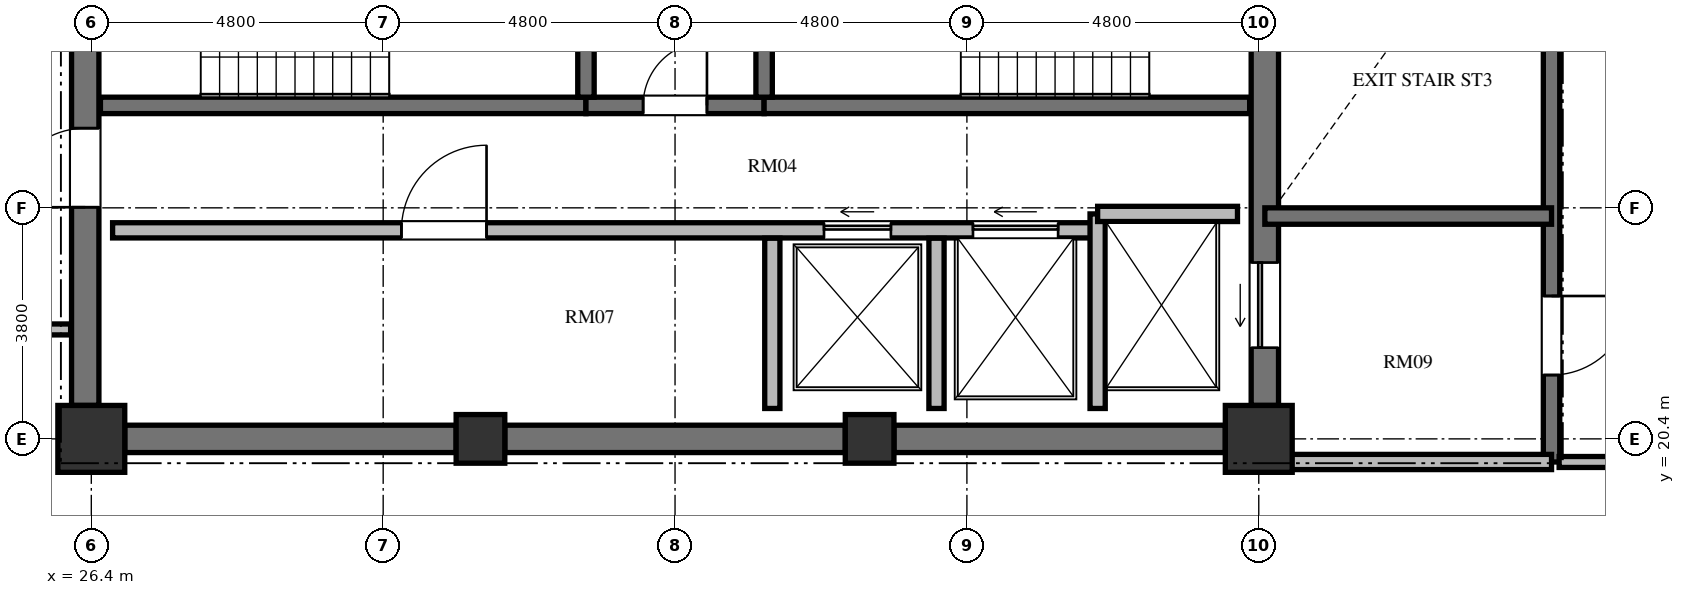
"""IFC4 building model, lengths in metres.
Left out: names, types, materials, properties, quantities, classifications, styles, units other than length and angle.
Written with IfcOpenShell. Run it as: python <this file> out.ifc"""

import sys

from ifc_helpers import new_model, si_unit, direction, frame, frame_2d, origin, origin_2d, place, context, subcontext, project, spatial, rectangle, extrude, element, fill, save


model = new_model("IFC4")
c1 = context("Model", 3, precision=1e-05, world=origin(), true_north=direction((0.0, 1.0)))
c2 = subcontext(c1, "Body", "Model", "MODEL_VIEW")
j1 = project(units=[si_unit("LENGTHUNIT", "METRE"), si_unit("PLANEANGLEUNIT", "RADIAN")], contexts=[c1])
p1 = place(None, origin())
s1 = spatial("IfcSite", under=j1, at=p1, CompositionType="ELEMENT")
p2 = place(p1, origin())
s2 = spatial("IfcBuilding", under=s1, at=p2, CompositionType="ELEMENT")
p3 = place(p2, frame((0.0, 0.0, 298.8)))
s3 = spatial("IfcBuildingStorey", under=s2, at=p3, CompositionType="ELEMENT", Elevation=298.8)
p4 = place(p3, frame((26.4, 20.4, 0.0), z_axis=(0.0, 0.0, 1.0), x_axis=(1.0, 0.0, 0.0)))
e1 = element("IfcColumn", 1, at=p4, inside=s3, PredefinedType="COLUMN", context=c2, shape_type="SweptSolid", body=[
    extrude(rectangle(XDim=1.1, YDim=1.1, at=origin_2d()), origin(), (0.0, 0.0, 1.0), 3.648),
])
for number, where, z_axis, x_axis in (
    (2, (32.8, 20.4, 0.0), (0.0, 0.0, 1.0), (1.0, 0.0, 0.0)),
    (3, (39.2, 20.4, 0.0), (0.0, 0.0, 1.0), (1.0, 0.0, 0.0)),
):
    element("IfcColumn", number, at=place(p3, frame(where, z_axis=z_axis, x_axis=x_axis)), inside=s3, PredefinedType="COLUMN", context=c2, shape_type="SweptSolid", body=[
        extrude(rectangle(XDim=0.8, YDim=0.8, at=origin_2d()), origin(), (0.0, 0.0, 1.0), 3.648),
    ])
p5 = place(p3, frame((45.6, 20.4, 0.0), z_axis=(0.0, 0.0, 1.0), x_axis=(1.0, 0.0, 0.0)))
e4 = element("IfcColumn", 4, at=p5, inside=s3, PredefinedType="COLUMN", context=c2, shape_type="SweptSolid", body=[
    extrude(rectangle(XDim=1.1, YDim=1.1, at=origin_2d()), origin(), (0.0, 0.0, 1.0), 3.648),
])
p6 = place(p3, frame((26.3, 20.95, 0.0), z_axis=(0.0, 0.0, 1.0), x_axis=(0.0, 1.0, 0.0)))
e5 = element("IfcWall", 5, at=p6, inside=s3, PredefinedType="SHEAR", context=c2, shape_type="SweptSolid", body=[
    extrude(rectangle(XDim=14.1, YDim=0.45, at=frame_2d((7.05, 0.0))), origin(), (0.0, 0.0, 1.0), 3.648),
])
p7 = place(p6, frame((6.5, 0.0, 0.0)))
e6 = element("IfcOpeningElement", 6, at=p7, cuts=e5, PredefinedType="OPENING", context=c2, shape_type="SweptSolid", body=[
    extrude(rectangle(XDim=1.2, YDim=2.15, at=frame_2d((0.6, 1.075))), frame((0.0, 0.235, 0.0), z_axis=(0.0, -1.0, 0.0), x_axis=(1.0, 0.0, 0.0)), (0.0, 0.0, 1.0), 0.47),
])
p8 = place(p6, frame((9.6, 0.0, 0.0)))
e7 = element("IfcOpeningElement", 7, at=p8, cuts=e5, PredefinedType="OPENING", context=c2, shape_type="SweptSolid", body=[
    extrude(rectangle(XDim=1.3, YDim=2.2, at=frame_2d((0.65, 1.1))), frame((0.0, 0.235, 0.0), z_axis=(0.0, -1.0, 0.0), x_axis=(1.0, 0.0, 0.0)), (0.0, 0.0, 1.0), 0.47),
])
p9 = place(p6, frame((3.26, 0.0, 0.0)))
e8 = element("IfcOpeningElement", 8, at=p9, cuts=e5, PredefinedType="OPENING", context=c2, shape_type="SweptSolid", body=[
    extrude(rectangle(XDim=1.3, YDim=2.2, at=frame_2d((0.65, 1.1))), frame((0.0, 0.235, 0.0), z_axis=(0.0, -1.0, 0.0), x_axis=(1.0, 0.0, 0.0)), (0.0, 0.0, 1.0), 0.47),
])
p10 = place(p3, frame((45.7, 20.95, 0.0), z_axis=(0.0, 0.0, 1.0), x_axis=(0.0, 1.0, 0.0)))
e9 = element("IfcWall", 9, at=p10, inside=s3, PredefinedType="SHEAR", context=c2, shape_type="SweptSolid", body=[
    extrude(rectangle(XDim=14.1, YDim=0.45, at=frame_2d((7.05, 0.0))), origin(), (0.0, 0.0, 1.0), 3.648),
])
p11 = place(p10, frame((11.75, 0.0, 0.0)))
e10 = element("IfcOpeningElement", 10, at=p11, cuts=e9, PredefinedType="OPENING", context=c2, shape_type="SweptSolid", body=[
    extrude(rectangle(XDim=1.4, YDim=2.3, at=frame_2d((0.7, 1.15))), frame((0.0, 0.235, 0.0), z_axis=(0.0, -1.0, 0.0), x_axis=(1.0, 0.0, 0.0)), (0.0, 0.0, 1.0), 0.47),
])
p12 = place(p10, frame((0.95, 0.0, 0.0)))
e11 = element("IfcOpeningElement", 11, at=p12, cuts=e9, PredefinedType="OPENING", context=c2, shape_type="SweptSolid", body=[
    extrude(rectangle(XDim=1.4, YDim=2.3, at=frame_2d((0.7, 1.15))), frame((0.0, 0.235, 0.0), z_axis=(0.0, -1.0, 0.0), x_axis=(1.0, 0.0, 0.0)), (0.0, 0.0, 1.0), 0.47),
])
p13 = place(p3, frame((26.95, 20.4, 0.0), z_axis=(0.0, 0.0, 1.0), x_axis=(1.0, 0.0, 0.0)))
e12 = element("IfcWall", 12, at=p13, inside=s3, PredefinedType="SHEAR", context=c2, shape_type="SweptSolid", body=[
    extrude(rectangle(XDim=5.45, YDim=0.45, at=frame_2d((2.725, 0.0))), origin(), (0.0, 0.0, 1.0), 3.648),
])
p14 = place(p3, frame((33.2, 20.4, 0.0), z_axis=(0.0, 0.0, 1.0), x_axis=(1.0, 0.0, 0.0)))
e13 = element("IfcWall", 13, at=p14, inside=s3, PredefinedType="SHEAR", context=c2, shape_type="SweptSolid", body=[
    extrude(rectangle(XDim=5.6, YDim=0.45, at=frame_2d((2.8, 0.0))), origin(), (0.0, 0.0, 1.0), 3.648),
])
p15 = place(p3, frame((39.6, 20.4, 0.0), z_axis=(0.0, 0.0, 1.0), x_axis=(1.0, 0.0, 0.0)))
e14 = element("IfcWall", 14, at=p15, inside=s3, PredefinedType="SHEAR", context=c2, shape_type="SweptSolid", body=[
    extrude(rectangle(XDim=5.45, YDim=0.45, at=frame_2d((2.725, 0.0))), origin(), (0.0, 0.0, 1.0), 3.648),
])
p16 = place(p3, frame((26.55, 25.885, 0.0), z_axis=(0.0, 0.0, 1.0), x_axis=(1.0, 0.0, 0.0)))
e15 = element("IfcWall", 15, at=p16, inside=s3, PredefinedType="SHEAR", context=c2, shape_type="SweptSolid", body=[
    extrude(rectangle(XDim=7.985, YDim=0.27, at=frame_2d((3.992, 0.0))), origin(), (0.0, 0.0, 1.0), 3.648),
])
p17 = place(p3, frame((34.535, 25.885, 0.0), z_axis=(0.0, 0.0, 1.0), x_axis=(1.0, 0.0, 0.0)))
e16 = element("IfcWall", 16, at=p17, inside=s3, PredefinedType="SHEAR", context=c2, shape_type="SweptSolid", body=[
    extrude(rectangle(XDim=2.93, YDim=0.27, at=frame_2d((1.465, 0.0))), origin(), (0.0, 0.0, 1.0), 3.648),
])
p18 = place(p17, frame((0.94, 0.0, 0.0)))
e17 = element("IfcOpeningElement", 17, at=p18, cuts=e16, PredefinedType="OPENING", context=c2, shape_type="SweptSolid", body=[
    extrude(rectangle(XDim=1.05, YDim=2.15, at=frame_2d((0.525, 1.075))), frame((0.0, 0.145, 0.0), z_axis=(0.0, -1.0, 0.0), x_axis=(1.0, 0.0, 0.0)), (0.0, 0.0, 1.0), 0.29),
])
p19 = place(p3, frame((37.465, 25.885, 0.0), z_axis=(0.0, 0.0, 1.0), x_axis=(1.0, 0.0, 0.0)))
e18 = element("IfcWall", 18, at=p19, inside=s3, PredefinedType="SHEAR", context=c2, shape_type="SweptSolid", body=[
    extrude(rectangle(XDim=7.985, YDim=0.27, at=frame_2d((3.992, 0.0))), origin(), (0.0, 0.0, 1.0), 3.648),
])
for number, where, z_axis, x_axis in (
    (19, (34.535, 26.02, 0.0), (0.0, 0.0, 1.0), (0.0, 1.0, 0.0)),
    (20, (37.465, 26.02, 0.0), (0.0, 0.0, 1.0), (0.0, 1.0, 0.0)),
):
    element("IfcWall", number, at=place(p3, frame(where, z_axis=z_axis, x_axis=x_axis)), inside=s3, PredefinedType="SHEAR", context=c2, shape_type="SweptSolid", body=[
        extrude(rectangle(XDim=4.08, YDim=0.27, at=frame_2d((2.04, 0.0))), origin(), (0.0, 0.0, 1.0), 3.648),
    ])
p20 = place(p3, frame((26.75, 23.83, 0.0), z_axis=(0.0, 0.0, 1.0), x_axis=(1.0, 0.0, 0.0)))
e21 = element("IfcWall", 21, at=p20, inside=s3, PredefinedType="SOLIDWALL", context=c2, shape_type="SweptSolid", body=[
    extrude(rectangle(XDim=16.2, YDim=0.25, at=frame_2d((8.1, 0.0))), origin(), (0.0, 0.0, 1.0), 3.328),
])
p21 = place(p20, frame((4.75, 0.0, 0.0)))
e22 = element("IfcOpeningElement", 22, at=p21, cuts=e21, PredefinedType="OPENING", context=c2, shape_type="SweptSolid", body=[
    extrude(rectangle(XDim=1.4, YDim=2.2, at=frame_2d((0.7, 1.1))), frame((0.0, 0.135, 0.0), z_axis=(0.0, -1.0, 0.0), x_axis=(1.0, 0.0, 0.0)), (0.0, 0.0, 1.0), 0.27),
])
p22 = place(p20, frame((11.7, 0.0, 0.0)))
e23 = element("IfcOpeningElement", 23, at=p22, cuts=e21, PredefinedType="OPENING", context=c2, shape_type="SweptSolid", body=[
    extrude(rectangle(XDim=1.1, YDim=2.2, at=frame_2d((0.55, 1.1))), frame((0.0, 0.135, 0.0), z_axis=(0.0, -1.0, 0.0), x_axis=(1.0, 0.0, 0.0)), (0.0, 0.0, 1.0), 0.27),
])
p23 = place(p20, frame((14.15, 0.0, 0.0)))
e24 = element("IfcOpeningElement", 24, at=p23, cuts=e21, PredefinedType="OPENING", context=c2, shape_type="SweptSolid", body=[
    extrude(rectangle(XDim=1.4, YDim=2.3, at=frame_2d((0.7, 1.15))), frame((0.0, 0.135, 0.0), z_axis=(0.0, -1.0, 0.0), x_axis=(1.0, 0.0, 0.0)), (0.0, 0.0, 1.0), 0.27),
])
p24 = place(p3, frame((42.95, 20.9, 0.0), z_axis=(0.0, 0.0, 1.0), x_axis=(0.0, 1.0, 0.0)))
e25 = element("IfcWall", 25, at=p24, inside=s3, PredefinedType="SOLIDWALL", context=c2, shape_type="SweptSolid", body=[
    extrude(rectangle(XDim=3.2, YDim=0.25, at=frame_2d((1.6, 0.0))), origin(), (0.0, 0.0, 1.0), 3.328),
])
p25 = place(p3, frame((42.95, 24.1, 0.0), z_axis=(0.0, 0.0, 1.0), x_axis=(1.0, 0.0, 0.0)))
e26 = element("IfcWall", 26, at=p25, inside=s3, PredefinedType="SOLIDWALL", context=c2, shape_type="SweptSolid", body=[
    extrude(rectangle(XDim=2.3, YDim=0.25, at=frame_2d((1.15, 0.0))), origin(), (0.0, 0.0, 1.0), 3.328),
])
for number, where, z_axis, x_axis in (
    (27, (37.6, 20.9, 0.0), (0.0, 0.0, 1.0), (0.0, 1.0, 0.0)),
    (28, (40.3, 20.9, 0.0), (0.0, 0.0, 1.0), (0.0, 1.0, 0.0)),
):
    element("IfcWall", number, at=place(p3, frame(where, z_axis=z_axis, x_axis=x_axis)), inside=s3, PredefinedType="SOLIDWALL", context=c2, shape_type="SweptSolid", body=[
        extrude(rectangle(XDim=2.8, YDim=0.25, at=frame_2d((1.4, 0.0))), origin(), (0.0, 0.0, 1.0), 3.328),
    ])
p26 = place(p3, frame((50.415, 35.845, 0.0), z_axis=(0.0, 0.0, 1.0), x_axis=(0.0, -1.0, 0.0)))
e29 = element("IfcWall", 29, at=p26, inside=s3, PredefinedType="SHEAR", context=c2, shape_type="SweptSolid", body=[
    extrude(rectangle(XDim=15.825, YDim=0.27, at=frame_2d((7.913, 0.0))), origin(), (0.0, 0.0, 1.0), 3.648),
])
p27 = place(p26, frame((4.445, 0.0, 0.0)))
e30 = element("IfcOpeningElement", 30, at=p27, cuts=e29, PredefinedType="OPENING", context=c2, shape_type="SweptSolid", body=[
    extrude(rectangle(XDim=1.2, YDim=2.15, at=frame_2d((0.6, 1.075))), frame((0.0, 0.145, 0.0), z_axis=(0.0, -1.0, 0.0), x_axis=(1.0, 0.0, 0.0)), (0.0, 0.0, 1.0), 0.29),
])
p28 = place(p26, frame((2.445, 0.0, 0.0)))
e31 = element("IfcOpeningElement", 31, at=p28, cuts=e29, PredefinedType="OPENING", context=c2, shape_type="SweptSolid", body=[
    extrude(rectangle(XDim=1.3, YDim=2.2, at=frame_2d((0.65, 1.1))), frame((0.0, 0.145, 0.0), z_axis=(0.0, -1.0, 0.0), x_axis=(1.0, 0.0, 0.0)), (0.0, 0.0, 1.0), 0.29),
])
p29 = place(p26, frame((13.095, 0.0, 0.0)))
e32 = element("IfcOpeningElement", 32, at=p29, cuts=e29, PredefinedType="OPENING", context=c2, shape_type="SweptSolid", body=[
    extrude(rectangle(XDim=1.3, YDim=2.2, at=frame_2d((0.65, 1.1))), frame((0.0, 0.145, 0.0), z_axis=(0.0, -1.0, 0.0), x_axis=(1.0, 0.0, 0.0)), (0.0, 0.0, 1.0), 0.29),
])
p30 = place(p3, frame((45.7, 24.065, 0.0), z_axis=(0.0, 0.0, 1.0), x_axis=(1.0, 0.0, 0.0)))
e33 = element("IfcWall", 33, at=p30, inside=s3, PredefinedType="SHEAR", context=c2, shape_type="SweptSolid", body=[
    extrude(rectangle(XDim=4.715, YDim=0.27, at=frame_2d((2.357, 0.0))), origin(), (0.0, 0.0, 1.0), 3.648),
])
p31 = place(p3, frame((45.7, 20.02, 0.0), z_axis=(0.0, 0.0, 1.0), x_axis=(1.0, 0.0, 0.0)))
e34 = element("IfcWall", 34, at=p31, inside=s3, PredefinedType="SOLIDWALL", context=c2, shape_type="SweptSolid", body=[
    extrude(rectangle(XDim=4.715, YDim=0.25, at=frame_2d((2.357, 0.0))), origin(), (0.0, 0.0, 1.0), 3.328),
])
p32 = place(p3, frame((52.358, 20.02, 0.0), z_axis=(0.0, 0.0, 1.0), x_axis=(-1.0, 0.0, 0.0)))
e35 = element("IfcWall", 35, at=p32, inside=s3, PredefinedType="PARTITIONING", context=c2, shape_type="SweptSolid", body=[
    extrude(rectangle(XDim=1.818, YDim=0.18, at=frame_2d((0.909, 0.0))), origin(), (0.0, 0.0, 1.0), 2.113),
])
p33 = place(p3, frame((26.06, 22.2, 0.0), z_axis=(0.0, 0.0, 1.0), x_axis=(-1.0, 0.0, 0.0)))
e36 = element("IfcWall", 36, at=p33, inside=s3, PredefinedType="PARTITIONING", context=c2, shape_type="SweptSolid", body=[
    extrude(rectangle(XDim=2.35, YDim=0.18, at=frame_2d((1.175, 0.0))), origin(), (0.0, 0.0, 1.0), 3.328),
])
p34 = place(p18, origin())
e37 = element("IfcDoor", 37, at=p34, inside=s3, OperationType="SINGLE_SWING_RIGHT", PredefinedType="DOOR", context=c2, shape_type="SweptSolid", body=[
    extrude(rectangle(XDim=1.05, YDim=2.15, at=frame_2d((0.525, 1.075))), frame((0.0, 0.025, 0.0), z_axis=(0.0, -1.0, 0.0), x_axis=(1.0, 0.0, 0.0)), (0.0, 0.0, 1.0), 0.05),
])
fill(e17, e37)
p35 = place(p9, origin())
e38 = element("IfcDoor", 38, at=p35, inside=s3, OperationType="SINGLE_SWING_LEFT", PredefinedType="DOOR", context=c2, shape_type="SweptSolid", body=[
    extrude(rectangle(XDim=1.3, YDim=2.2, at=frame_2d((0.65, 1.1))), frame((0.0, 0.025, 0.0), z_axis=(0.0, -1.0, 0.0), x_axis=(1.0, 0.0, 0.0)), (0.0, 0.0, 1.0), 0.05),
])
fill(e8, e38)
p36 = place(p21, origin())
e39 = element("IfcDoor", 39, at=p36, inside=s3, OperationType="SINGLE_SWING_RIGHT", PredefinedType="DOOR", context=c2, shape_type="SweptSolid", body=[
    extrude(rectangle(XDim=1.4, YDim=2.2, at=frame_2d((0.7, 1.1))), frame((0.0, 0.025, 0.0), z_axis=(0.0, -1.0, 0.0), x_axis=(1.0, 0.0, 0.0)), (0.0, 0.0, 1.0), 0.05),
])
fill(e22, e39)
p37 = place(p22, origin())
e40 = element("IfcDoor", 40, at=p37, inside=s3, OperationType="SLIDING_TO_LEFT", PredefinedType="DOOR", context=c2, shape_type="SweptSolid", body=[
    extrude(rectangle(XDim=1.1, YDim=2.2, at=frame_2d((0.55, 1.1))), frame((0.0, 0.025, 0.0), z_axis=(0.0, -1.0, 0.0), x_axis=(1.0, 0.0, 0.0)), (0.0, 0.0, 1.0), 0.05),
])
fill(e23, e40)
p38 = place(p12, origin())
e41 = element("IfcDoor", 41, at=p38, inside=s3, OperationType="SLIDING_TO_LEFT", PredefinedType="DOOR", context=c2, shape_type="SweptSolid", body=[
    extrude(rectangle(XDim=1.4, YDim=2.3, at=frame_2d((0.7, 1.15))), frame((0.0, 0.025, 0.0), z_axis=(0.0, -1.0, 0.0), x_axis=(1.0, 0.0, 0.0)), (0.0, 0.0, 1.0), 0.05),
])
fill(e11, e41)
p39 = place(p23, origin())
e42 = element("IfcDoor", 42, at=p39, inside=s3, OperationType="SLIDING_TO_LEFT", PredefinedType="DOOR", context=c2, shape_type="SweptSolid", body=[
    extrude(rectangle(XDim=1.4, YDim=2.3, at=frame_2d((0.7, 1.15))), frame((0.0, 0.025, 0.0), z_axis=(0.0, -1.0, 0.0), x_axis=(1.0, 0.0, 0.0)), (0.0, 0.0, 1.0), 0.05),
])
fill(e24, e42)
p40 = place(p29, origin())
e43 = element("IfcDoor", 43, at=p40, inside=s3, OperationType="SINGLE_SWING_LEFT", PredefinedType="DOOR", context=c2, shape_type="SweptSolid", body=[
    extrude(rectangle(XDim=1.3, YDim=2.2, at=frame_2d((0.65, 1.1))), frame((0.0, 0.025, 0.0), z_axis=(0.0, -1.0, 0.0), x_axis=(1.0, 0.0, 0.0)), (0.0, 0.0, 1.0), 0.05),
])
fill(e32, e43)
save(model, sys.argv[1])
